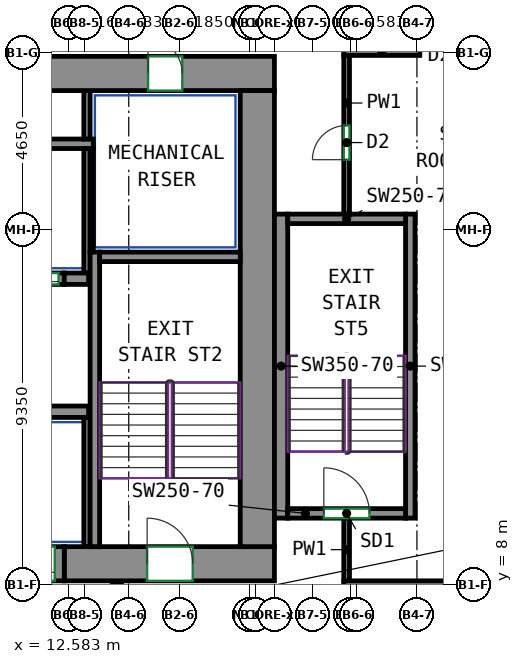
"""IFC4 building model, lengths in metres.
Left out: names, types, materials, properties, quantities, classifications, styles, units other than length and angle.
Written with IfcOpenShell. Run it as: python <this file> out.ifc"""

import sys

from ifc_helpers import new_model, si_unit, direction, frame, frame_2d, origin, place, context, subcontext, project, spatial, rectangle, extrude, source, transform, mapped, element, fill, save


model = new_model("IFC4")
c1 = context("Model", 3, precision=1e-05, world=origin(), true_north=direction((0.0, 1.0)))
c2 = subcontext(c1, "Body", "Model", "MODEL_VIEW")
j1 = project(units=[si_unit("LENGTHUNIT", "METRE"), si_unit("PLANEANGLEUNIT", "RADIAN")], contexts=[c1])
p1 = place(None, origin())
s1 = spatial("IfcSite", under=j1, at=p1, CompositionType="ELEMENT")
p2 = place(p1, origin())
s2 = spatial("IfcBuilding", under=s1, at=p2, CompositionType="ELEMENT")
p3 = place(p2, frame((0.0, 0.0, 168.5)))
s3 = spatial("IfcBuildingStorey", under=s2, at=p3, CompositionType="ELEMENT", Elevation=168.5)
m1 = source(origin(), c2, "Body", "SweptSolid", [
    extrude(rectangle(XDim=5.53, YDim=0.9, at=frame_2d((2.765, 0.0))), origin(), (0.0, 0.0, 1.0), 3.12),
])
p4 = place(p3, frame((12.47, 8.55, 0.0), z_axis=(0.0, 0.0, 1.0), x_axis=(1.0, 0.0, 0.0)))
e1 = element("IfcWall", 1, at=p4, inside=s3, PredefinedType="SHEAR", context=c2, shape_type="MappedRepresentation", body=[
    mapped(m1, transform((0.0, 0.0, 0.0))),
])
p5 = place(p4, frame((2.18, 0.0, 0.0)))
e2 = element("IfcOpeningElement", 2, at=p5, cuts=e1, PredefinedType="OPENING", context=c2, shape_type="SweptSolid", body=[
    extrude(rectangle(XDim=1.2, YDim=2.1, at=frame_2d((0.6, 1.05))), frame((0.0, 0.46, 0.0), z_axis=(0.0, -1.0, 0.0), x_axis=(1.0, 0.0, 0.0)), (0.0, 0.0, 1.0), 0.92),
])
m2 = source(origin(), c2, "Body", "SweptSolid", [
    extrude(rectangle(XDim=33.9, YDim=0.9, at=frame_2d((16.95, 0.0))), origin(), (0.0, 0.0, 1.0), 3.12),
])
p6 = place(p3, frame((-15.9, 21.45, 0.0), z_axis=(0.0, 0.0, 1.0), x_axis=(1.0, 0.0, 0.0)))
e3 = element("IfcWall", 3, at=p6, inside=s3, PredefinedType="SHEAR", context=c2, shape_type="MappedRepresentation", body=[
    mapped(m2, transform((0.0, 0.0, 0.0))),
])
p7 = place(p6, frame((8.42, 0.0, 0.0)))
e4 = element("IfcOpeningElement", 4, at=p7, cuts=e3, PredefinedType="OPENING", context=c2, shape_type="SweptSolid", body=[
    extrude(rectangle(XDim=0.9, YDim=2.1, at=frame_2d((0.45, 1.05))), frame((0.0, 0.46, 0.0), z_axis=(0.0, -1.0, 0.0), x_axis=(1.0, 0.0, 0.0)), (0.0, 0.0, 1.0), 0.92),
])
p8 = place(p6, frame((15.12, 0.0, 0.0)))
e5 = element("IfcOpeningElement", 5, at=p8, cuts=e3, PredefinedType="OPENING", context=c2, shape_type="SweptSolid", body=[
    extrude(rectangle(XDim=0.9, YDim=2.1, at=frame_2d((0.45, 1.05))), frame((0.0, 0.46, 0.0), z_axis=(0.0, -1.0, 0.0), x_axis=(1.0, 0.0, 0.0)), (0.0, 0.0, 1.0), 0.92),
])
p9 = place(p6, frame((19.944, 0.0, 0.0)))
e6 = element("IfcOpeningElement", 6, at=p9, cuts=e3, PredefinedType="OPENING", context=c2, shape_type="SweptSolid", body=[
    extrude(rectangle(XDim=0.9, YDim=2.1, at=frame_2d((0.45, 1.05))), frame((0.0, 0.46, 0.0), z_axis=(0.0, -1.0, 0.0), x_axis=(1.0, 0.0, 0.0)), (0.0, 0.0, 1.0), 0.92),
])
p10 = place(p6, frame((25.304, 0.0, 0.0)))
e7 = element("IfcOpeningElement", 7, at=p10, cuts=e3, PredefinedType="OPENING", context=c2, shape_type="SweptSolid", body=[
    extrude(rectangle(XDim=0.9, YDim=2.1, at=frame_2d((0.45, 1.05))), frame((0.0, 0.46, 0.0), z_axis=(0.0, -1.0, 0.0), x_axis=(1.0, 0.0, 0.0)), (0.0, 0.0, 1.0), 0.92),
])
p11 = place(p6, frame((2.425, 0.0, 0.0)))
e8 = element("IfcOpeningElement", 8, at=p11, cuts=e3, PredefinedType="OPENING", context=c2, shape_type="SweptSolid", body=[
    extrude(rectangle(XDim=0.9, YDim=2.1, at=frame_2d((0.45, 1.05))), frame((0.0, 0.46, 0.0), z_axis=(0.0, -1.0, 0.0), x_axis=(1.0, 0.0, 0.0)), (0.0, 0.0, 1.0), 0.92),
])
p12 = place(p6, frame((30.575, 0.0, 0.0)))
e9 = element("IfcOpeningElement", 9, at=p12, cuts=e3, PredefinedType="OPENING", context=c2, shape_type="SweptSolid", body=[
    extrude(rectangle(XDim=0.9, YDim=2.1, at=frame_2d((0.45, 1.05))), frame((0.0, 0.46, 0.0), z_axis=(0.0, -1.0, 0.0), x_axis=(1.0, 0.0, 0.0)), (0.0, 0.0, 1.0), 0.92),
])
m3 = source(origin(), c2, "Body", "SweptSolid", [
    extrude(rectangle(XDim=12.0, YDim=0.9, at=frame_2d((6.0, 0.0))), origin(), (0.0, 0.0, 1.0), 3.12),
])
p13 = place(p3, frame((17.55, 9.0, 0.0), z_axis=(0.0, 0.0, 1.0), x_axis=(0.0, 1.0, 0.0)))
e10 = element("IfcWall", 10, at=p13, inside=s3, PredefinedType="SHEAR", context=c2, shape_type="MappedRepresentation", body=[
    mapped(m3, transform((0.0, 0.0, 0.0))),
])
m4 = source(origin(), c2, "Body", "SweptSolid", [
    extrude(rectangle(XDim=7.75, YDim=0.25, at=frame_2d((3.875, 0.0))), origin(), (0.0, 0.0, 1.0), 3.12),
])
p14 = place(p3, frame((13.275, 9.0, 0.0), z_axis=(0.0, 0.0, 1.0), x_axis=(0.0, 1.0, 0.0)))
e11 = element("IfcWall", 11, at=p14, inside=s3, PredefinedType="SHEAR", context=c2, shape_type="MappedRepresentation", body=[
    mapped(m4, transform((0.0, 0.0, 0.0))),
])
m5 = source(origin(), c2, "Body", "SweptSolid", [
    extrude(rectangle(XDim=3.7, YDim=0.25, at=frame_2d((1.85, 0.0))), origin(), (0.0, 0.0, 1.0), 3.12),
])
p15 = place(p3, frame((13.4, 16.625, 0.0), z_axis=(0.0, 0.0, 1.0), x_axis=(1.0, 0.0, 0.0)))
e12 = element("IfcWall", 12, at=p15, inside=s3, PredefinedType="SHEAR", context=c2, shape_type="MappedRepresentation", body=[
    mapped(m5, transform((0.0, 0.0, 0.0))),
])
m6 = source(origin(), c2, "Body", "SweptSolid", [
    extrude(rectangle(XDim=8.0, YDim=0.35, at=frame_2d((4.0, 0.0))), origin(), (0.0, 0.0, 1.0), 3.12),
])
p16 = place(p3, frame((18.175, 9.75, 0.0), z_axis=(0.0, 0.0, 1.0), x_axis=(0.0, 1.0, 0.0)))
e13 = element("IfcWall", 13, at=p16, inside=s3, PredefinedType="SHEAR", context=c2, shape_type="MappedRepresentation", body=[
    mapped(m6, transform((0.0, 0.0, 0.0))),
])
m7 = source(origin(), c2, "Body", "SweptSolid", [
    extrude(rectangle(XDim=8.0, YDim=0.25, at=frame_2d((4.0, 0.0))), origin(), (0.0, 0.0, 1.0), 3.12),
])
p17 = place(p3, frame((21.575, 9.75, 0.0), z_axis=(0.0, 0.0, 1.0), x_axis=(0.0, 1.0, 0.0)))
e14 = element("IfcWall", 14, at=p17, inside=s3, PredefinedType="SHEAR", context=c2, shape_type="MappedRepresentation", body=[
    mapped(m7, transform((0.0, 0.0, 0.0))),
])
m8 = source(origin(), c2, "Body", "SweptSolid", [
    extrude(rectangle(XDim=3.1, YDim=0.25, at=frame_2d((1.55, 0.0))), origin(), (0.0, 0.0, 1.0), 3.12),
])
p18 = place(p3, frame((18.35, 9.875, 0.0), z_axis=(0.0, 0.0, 1.0), x_axis=(1.0, 0.0, 0.0)))
e15 = element("IfcWall", 15, at=p18, inside=s3, PredefinedType="SHEAR", context=c2, shape_type="MappedRepresentation", body=[
    mapped(m8, transform((0.0, 0.0, 0.0))),
])
p19 = place(p18, frame((0.95, 0.0, 0.0)))
e16 = element("IfcOpeningElement", 16, at=p19, cuts=e15, PredefinedType="OPENING", context=c2, shape_type="SweptSolid", body=[
    extrude(rectangle(XDim=1.2, YDim=2.1, at=frame_2d((0.6, 1.05))), frame((0.0, 0.135, 0.0), z_axis=(0.0, -1.0, 0.0), x_axis=(1.0, 0.0, 0.0)), (0.0, 0.0, 1.0), 0.27),
])
p20 = place(p3, frame((18.35, 17.625, 0.0), z_axis=(0.0, 0.0, 1.0), x_axis=(1.0, 0.0, 0.0)))
e17 = element("IfcWall", 17, at=p20, inside=s3, PredefinedType="SHEAR", context=c2, shape_type="MappedRepresentation", body=[
    mapped(m8, transform((0.0, 0.0, 0.0))),
])
m9 = source(origin(), c2, "Body", "SweptSolid", [
    extrude(rectangle(XDim=2.82, YDim=0.3, at=frame_2d((1.41, 0.0))), origin(), (0.0, 0.0, 1.0), 3.12),
])
p21 = place(p3, frame((10.29, 12.55, 0.0), z_axis=(0.0, 0.0, 1.0), x_axis=(1.0, 0.0, 0.0)))
e18 = element("IfcWall", 18, at=p21, inside=s3, PredefinedType="SHEAR", context=c2, shape_type="MappedRepresentation", body=[
    mapped(m9, transform((0.0, 0.0, 0.0))),
])
m10 = source(origin(), c2, "Body", "SweptSolid", [
    extrude(rectangle(XDim=0.64, YDim=0.3, at=frame_2d((0.32, 0.0))), origin(), (0.0, 0.0, 1.0), 3.12),
])
p22 = place(p3, frame((12.47, 16.05, 0.0), z_axis=(0.0, 0.0, 1.0), x_axis=(1.0, 0.0, 0.0)))
e19 = element("IfcWall", 19, at=p22, inside=s3, PredefinedType="SHEAR", context=c2, shape_type="MappedRepresentation", body=[
    mapped(m10, transform((0.0, 0.0, 0.0))),
])
m11 = source(origin(), c2, "Body", "SweptSolid", [
    extrude(rectangle(XDim=1.4, YDim=0.3, at=frame_2d((0.7, 0.0))), origin(), (0.0, 0.0, 1.0), 3.12),
])
p23 = place(p3, frame((11.07, 16.05, 0.0), z_axis=(0.0, 0.0, 1.0), x_axis=(1.0, 0.0, 0.0)))
e20 = element("IfcWall", 20, at=p23, inside=s3, PredefinedType="PARTITIONING", context=c2, shape_type="MappedRepresentation", body=[
    mapped(m11, transform((0.0, 0.0, 0.0))),
])
p24 = place(p23, frame((0.15, 0.0, 0.0)))
e21 = element("IfcOpeningElement", 21, at=p24, cuts=e20, PredefinedType="OPENING", context=c2, shape_type="SweptSolid", body=[
    extrude(rectangle(XDim=1.1, YDim=2.1, at=frame_2d((0.55, 1.05))), frame((0.0, 0.16, 0.0), z_axis=(0.0, -1.0, 0.0), x_axis=(1.0, 0.0, 0.0)), (0.0, 0.0, 1.0), 0.32),
])
m12 = source(origin(), c2, "Body", "SweptSolid", [
    extrude(rectangle(XDim=10.97, YDim=0.25, at=frame_2d((5.485, 0.0))), origin(), (0.0, 0.0, 1.0), 3.12),
])
p25 = place(p3, frame((2.265, 19.6, 0.0), z_axis=(0.0, 0.0, 1.0), x_axis=(1.0, 0.0, 0.0)))
e22 = element("IfcWall", 22, at=p25, inside=s3, PredefinedType="PARTITIONING", context=c2, shape_type="MappedRepresentation", body=[
    mapped(m12, transform((0.0, 0.0, 0.0))),
])
m13 = source(origin(), c2, "Body", "SweptSolid", [
    extrude(rectangle(XDim=3.275, YDim=0.165, at=frame_2d((1.638, 0.0))), origin(), (0.0, 0.0, 1.0), 3.12),
])
p26 = place(p3, frame((13.067, 16.2, 0.0), z_axis=(0.0, 0.0, 1.0), x_axis=(0.0, 1.0, 0.0)))
e23 = element("IfcWall", 23, at=p26, inside=s3, PredefinedType="PARTITIONING", context=c2, shape_type="MappedRepresentation", body=[
    mapped(m13, transform((0.0, 0.0, 0.0))),
])
m14 = source(origin(), c2, "Body", "SweptSolid", [
    extrude(rectangle(XDim=1.275, YDim=0.165, at=frame_2d((0.637, 0.0))), origin(), (0.0, 0.0, 1.0), 3.12),
])
p27 = place(p3, frame((13.067, 19.725, 0.0), z_axis=(0.0, 0.0, 1.0), x_axis=(0.0, 1.0, 0.0)))
e24 = element("IfcWall", 24, at=p27, inside=s3, PredefinedType="PARTITIONING", context=c2, shape_type="MappedRepresentation", body=[
    mapped(m14, transform((0.0, 0.0, 0.0))),
])
m15 = source(origin(), c2, "Body", "SweptSolid", [
    extrude(rectangle(XDim=2.725, YDim=0.085, at=frame_2d((1.363, 0.0))), origin(), (0.0, 0.0, 1.0), 3.12),
])
p28 = place(p3, frame((13.192, 16.75, 0.0), z_axis=(0.0, 0.0, 1.0), x_axis=(0.0, 1.0, 0.0)))
e25 = element("IfcWall", 25, at=p28, inside=s3, PredefinedType="PARTITIONING", context=c2, shape_type="MappedRepresentation", body=[
    mapped(m15, transform((0.0, 0.0, 0.0))),
])
m16 = source(origin(), c2, "Body", "SweptSolid", [
    extrude(rectangle(XDim=3.4, YDim=0.165, at=frame_2d((1.7, 0.0))), origin(), (0.0, 0.0, 1.0), 3.12),
])
p29 = place(p3, frame((13.067, 9.0, 0.0), z_axis=(0.0, 0.0, 1.0), x_axis=(0.0, 1.0, 0.0)))
e26 = element("IfcWall", 26, at=p29, inside=s3, PredefinedType="PARTITIONING", context=c2, shape_type="MappedRepresentation", body=[
    mapped(m16, transform((0.0, 0.0, 0.0))),
])
m17 = source(origin(), c2, "Body", "SweptSolid", [
    extrude(rectangle(XDim=1.4, YDim=0.9, at=frame_2d((0.7, 0.0))), origin(), (0.0, 0.0, 1.0), 2.7),
])
p30 = place(p3, frame((11.07, 8.55, 0.0), z_axis=(0.0, 0.0, 1.0), x_axis=(1.0, 0.0, 0.0)))
e27 = element("IfcWall", 27, at=p30, inside=s3, PredefinedType="PARTITIONING", context=c2, shape_type="MappedRepresentation", body=[
    mapped(m17, transform((0.0, 0.0, 0.0))),
])
p31 = place(p30, frame((0.25, 0.0, 0.0)))
e28 = element("IfcOpeningElement", 28, at=p31, cuts=e27, PredefinedType="OPENING", context=c2, shape_type="SweptSolid", body=[
    extrude(rectangle(XDim=0.9, YDim=2.1, at=frame_2d((0.45, 1.05))), frame((0.0, 0.46, 0.0), z_axis=(0.0, -1.0, 0.0), x_axis=(1.0, 0.0, 0.0)), (0.0, 0.0, 1.0), 0.92),
])
p32 = place(p3, frame((19.825, 22.0, 0.0), z_axis=(0.0, 0.0, 1.0), x_axis=(1.0, 0.0, 0.0)))
e29 = element("IfcWall", 29, at=p32, inside=s3, PredefinedType="PARTITIONING", context=c2, shape_type="SweptSolid", body=[
    extrude(rectangle(XDim=2.0, YDim=0.15, at=frame_2d((1.0, 0.0))), origin(), (0.0, 0.0, 1.0), 3.12),
])
p33 = place(p3, frame((19.9, 17.75, 0.0), z_axis=(0.0, 0.0, 1.0), x_axis=(0.0, 1.0, 0.0)))
e30 = element("IfcWall", 30, at=p33, inside=s3, PredefinedType="PARTITIONING", context=c2, shape_type="SweptSolid", body=[
    extrude(rectangle(XDim=4.175, YDim=0.15, at=frame_2d((2.087, 0.0))), origin(), (0.0, 0.0, 1.0), 3.12),
])
p34 = place(p33, frame((1.432, 0.0, 0.0)))
e31 = element("IfcOpeningElement", 31, at=p34, cuts=e30, PredefinedType="OPENING", context=c2, shape_type="SweptSolid", body=[
    extrude(rectangle(XDim=0.9, YDim=2.1, at=frame_2d((0.45, 1.05))), frame((0.0, 0.085, 0.0), z_axis=(0.0, -1.0, 0.0), x_axis=(1.0, 0.0, 0.0)), (0.0, 0.0, 1.0), 0.17),
])
p35 = place(p3, frame((19.9, 8.09, 0.0), z_axis=(0.0, 0.0, 1.0), x_axis=(0.0, 1.0, 0.0)))
e32 = element("IfcWall", 32, at=p35, inside=s3, PredefinedType="PARTITIONING", context=c2, shape_type="SweptSolid", body=[
    extrude(rectangle(XDim=1.66, YDim=0.15, at=frame_2d((0.83, 0.0))), origin(), (0.0, 0.0, 1.0), 3.12),
])
p36 = place(p3, frame((19.827, 8.0, 0.0), z_axis=(0.0, 0.0, 1.0), x_axis=(1.0, 0.0, 0.0)))
e33 = element("IfcWall", 33, at=p36, inside=s3, PredefinedType="PARTITIONING", context=c2, shape_type="SweptSolid", body=[
    extrude(rectangle(XDim=4.573, YDim=0.2, at=frame_2d((2.287, 0.0))), origin(), (0.0, 0.0, 1.0), 3.12),
])
p37 = place(p31, origin())
e34 = element("IfcDoor", 34, at=p37, inside=s3, OperationType="SLIDING_TO_LEFT", PredefinedType="DOOR", context=c2, shape_type="SweptSolid", body=[
    extrude(rectangle(XDim=0.9, YDim=2.1, at=frame_2d((0.45, 1.05))), frame((0.0, 0.355, 0.0), z_axis=(0.0, -1.0, 0.0), x_axis=(1.0, 0.0, 0.0)), (0.0, 0.0, 1.0), 0.05),
])
fill(e28, e34)
p38 = place(p24, origin())
e35 = element("IfcDoor", 35, at=p38, inside=s3, OperationType="DOUBLE_DOOR_SLIDING", PredefinedType="DOOR", context=c2, shape_type="SweptSolid", body=[
    extrude(rectangle(XDim=1.1, YDim=2.1, at=frame_2d((0.55, 1.05))), frame((0.0, 0.025, 0.0), z_axis=(0.0, -1.0, 0.0), x_axis=(1.0, 0.0, 0.0)), (0.0, 0.0, 1.0), 0.05),
])
fill(e21, e35)
p39 = place(p12, origin())
e36 = element("IfcDoor", 36, at=p39, inside=s3, OperationType="SINGLE_SWING_LEFT", PredefinedType="DOOR", context=c2, shape_type="SweptSolid", body=[
    extrude(rectangle(XDim=0.9, YDim=2.1, at=frame_2d((0.45, 1.05))), frame((0.0, -0.305, 0.0), z_axis=(0.0, -1.0, 0.0), x_axis=(1.0, 0.0, 0.0)), (0.0, 0.0, 1.0), 0.05),
])
fill(e9, e36)
p40 = place(p5, origin())
e37 = element("IfcDoor", 37, at=p40, inside=s3, OperationType="DOUBLE_DOOR_SINGLE_SWING", PredefinedType="DOOR", context=c2, shape_type="SweptSolid", body=[
    extrude(rectangle(XDim=1.2, YDim=2.1, at=frame_2d((0.6, 1.05))), frame((0.0, 0.355, 0.0), z_axis=(0.0, -1.0, 0.0), x_axis=(1.0, 0.0, 0.0)), (0.0, 0.0, 1.0), 0.05),
])
fill(e2, e37)
p41 = place(p19, origin())
e38 = element("IfcDoor", 38, at=p41, inside=s3, OperationType="DOUBLE_DOOR_SINGLE_SWING", PredefinedType="DOOR", context=c2, shape_type="SweptSolid", body=[
    extrude(rectangle(XDim=1.2, YDim=2.1, at=frame_2d((0.6, 1.05))), frame((0.0, 0.025, 0.0), z_axis=(0.0, -1.0, 0.0), x_axis=(1.0, 0.0, 0.0)), (0.0, 0.0, 1.0), 0.05),
])
fill(e16, e38)
p42 = place(p34, origin())
e39 = element("IfcDoor", 39, at=p42, inside=s3, OperationType="SINGLE_SWING_LEFT", PredefinedType="DOOR", context=c2, shape_type="SweptSolid", body=[
    extrude(rectangle(XDim=0.9, YDim=2.1, at=frame_2d((0.45, 1.05))), frame((0.0, 0.025, 0.0), z_axis=(0.0, -1.0, 0.0), x_axis=(1.0, 0.0, 0.0)), (0.0, 0.0, 1.0), 0.05),
])
fill(e31, e39)
save(model, sys.argv[1])
